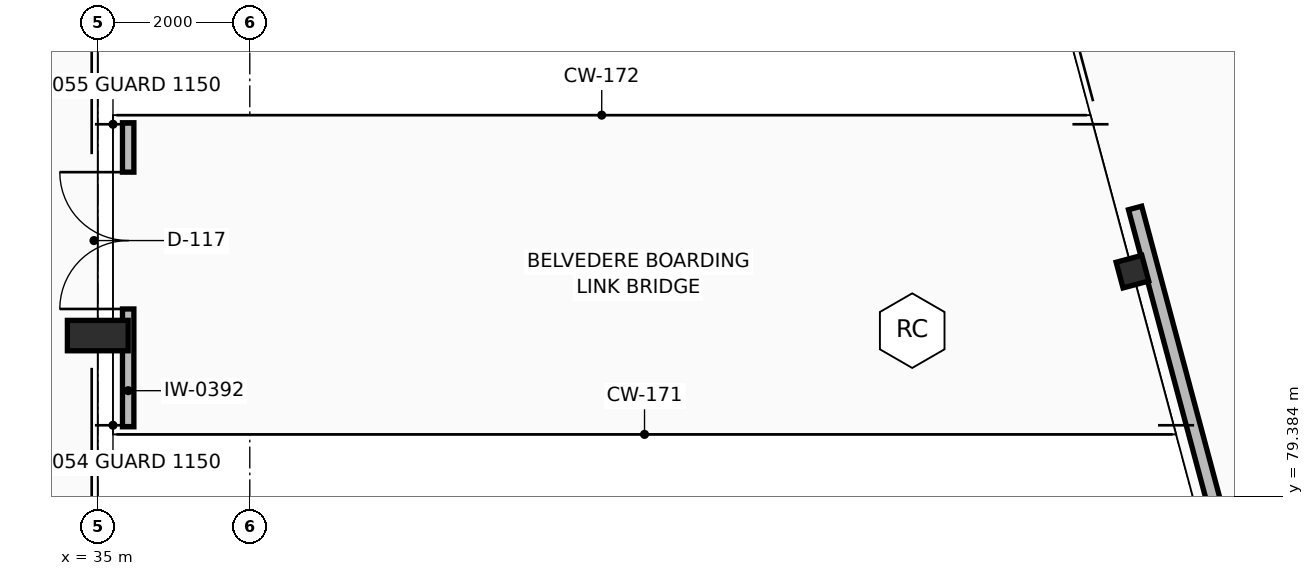
"""IFC4 building model, lengths in metres.
Left out: names, types, materials, properties, quantities, classifications, styles, units other than length and angle.
Written with IfcOpenShell. Run it as: python <this file> out.ifc"""

import sys

from ifc_helpers import new_model, si_unit, direction, frame, frame_2d, origin, origin_2d, place, context, subcontext, project, spatial, rectangle, hollow_rectangle, extrude, element, fill, save


model = new_model("IFC4")
c1 = context("Model", 3, precision=1e-05, world=origin(), true_north=direction((0.0, 1.0)))
c2 = subcontext(c1, "Body", "Model", "MODEL_VIEW")
j1 = project(units=[si_unit("LENGTHUNIT", "METRE"), si_unit("PLANEANGLEUNIT", "RADIAN")], contexts=[c1])
p1 = place(None, origin())
s1 = spatial("IfcSite", under=j1, at=p1, CompositionType="ELEMENT")
p2 = place(p1, origin())
s2 = spatial("IfcBuilding", under=s1, at=p2, CompositionType="ELEMENT")
p3 = place(p2, frame((0.0, 0.0, 9.6)))
s3 = spatial("IfcBuildingStorey", under=s2, at=p3, CompositionType="ELEMENT", Elevation=9.6)
p4 = place(p3, frame((35.0, 81.5, 0.0), z_axis=(0.0, 0.0, 1.0), x_axis=(0.0, 1.0, 0.0)))
e1 = element("IfcColumn", 1, at=p4, inside=s3, PredefinedType="PILASTER", context=c2, shape_type="SweptSolid", body=[
    extrude(rectangle(XDim=0.4, YDim=0.8, at=origin_2d()), origin(), (0.0, 0.0, 1.0), 4.8),
])
p5 = place(p3, frame((48.613, 82.341, 0.0), z_axis=(0.0, 0.0, 1.0), x_axis=(0.965925826289, 0.258819045103, 0.0)))
e2 = element("IfcColumn", 2, at=p5, inside=s3, PredefinedType="COLUMN", context=c2, shape_type="SweptSolid", body=[
    extrude(hollow_rectangle(XDim=0.35, YDim=0.35, WallThickness=0.016, at=origin_2d()), origin(), (0.0, 0.0, 1.0), 4.8),
])
p6 = place(p3, frame((35.4, 80.3, 0.0), z_axis=(0.0, 0.0, 1.0), x_axis=(0.0, 1.0, 0.0)))
e3 = element("IfcWall", 3, at=p6, inside=s3, PredefinedType="PARTITIONING", context=c2, shape_type="SweptSolid", body=[
    extrude(rectangle(XDim=4.0, YDim=0.15, at=frame_2d((2.0, 0.0))), origin(), (0.0, 0.0, 1.0), 2.742),
])
p7 = place(p6, frame((1.55, 0.0, 0.0)))
e4 = element("IfcOpeningElement", 4, at=p7, cuts=e3, PredefinedType="OPENING", context=c2, shape_type="SweptSolid", body=[
    extrude(rectangle(XDim=1.8, YDim=2.3, at=frame_2d((0.9, 1.15))), frame((0.0, 0.085, 0.0), z_axis=(0.0, -1.0, 0.0), x_axis=(1.0, 0.0, 0.0)), (0.0, 0.0, 1.0), 0.17),
])
p8 = place(p3, frame((49.683, 79.315, 0.0), z_axis=(0.0, 0.0, 1.0), x_axis=(-0.258771675905, 0.965938517582, 0.0)))
e5 = element("IfcWall", 5, at=p8, inside=s3, PredefinedType="STANDARD", context=c2, shape_type="SweptSolid", body=[
    extrude(rectangle(XDim=4.0, YDim=0.18, at=frame_2d((2.0, 0.0))), origin(), (0.0, 0.0, 1.0), 4.435),
])
p9 = place(p7, origin())
e6 = element("IfcDoor", 6, at=p9, inside=s3, OperationType="DOUBLE_SWING_RIGHT", PredefinedType="DOOR", context=c2, shape_type="SweptSolid", body=[
    extrude(rectangle(XDim=1.8, YDim=2.3, at=frame_2d((0.9, 1.15))), frame((0.0, 0.025, 0.0), z_axis=(0.0, -1.0, 0.0), x_axis=(1.0, 0.0, 0.0)), (0.0, 0.0, 1.0), 0.05),
])
fill(e4, e6)
save(model, sys.argv[1])
